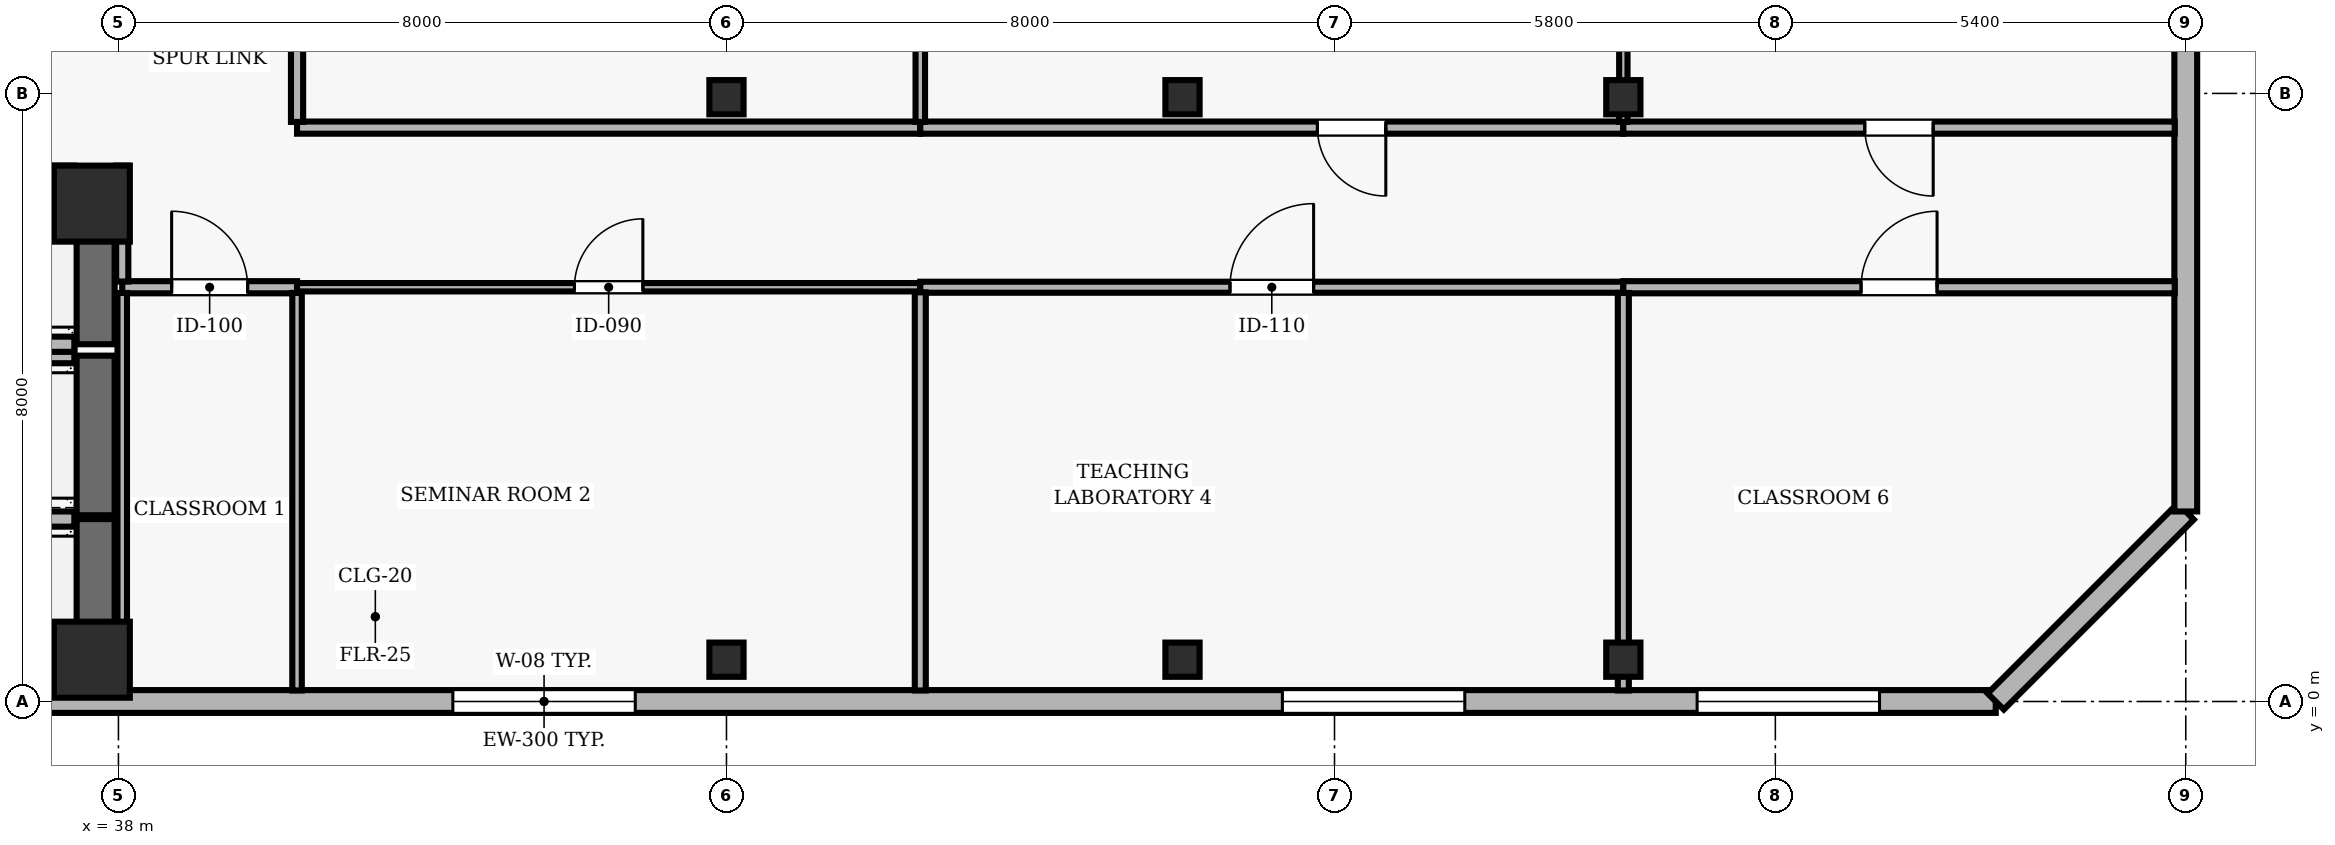
"""IFC4 building model, lengths in metres.
Left out: names, types, materials, properties, quantities, classifications, styles, units other than length and angle.
Written with IfcOpenShell. Run it as: python <this file> out.ifc"""

import sys

from ifc_helpers import new_model, si_unit, direction, frame, frame_2d, origin, origin_2d, place, context, subcontext, project, spatial, rectangle, hollow_rectangle, extrude, element, fill, save


model = new_model("IFC4")
c1 = context("Model", 3, precision=1e-05, world=origin(), true_north=direction((0.0, 1.0)))
c2 = subcontext(c1, "Body", "Model", "MODEL_VIEW")
j1 = project(units=[si_unit("LENGTHUNIT", "METRE"), si_unit("PLANEANGLEUNIT", "RADIAN")], contexts=[c1])
p1 = place(None, origin())
s1 = spatial("IfcSite", under=j1, at=p1, CompositionType="ELEMENT")
p2 = place(p1, origin())
s2 = spatial("IfcBuilding", under=s1, at=p2, CompositionType="ELEMENT")
p3 = place(p2, frame((0.0, 0.0, 179.7)))
s3 = spatial("IfcBuildingStorey", under=s2, at=p3, CompositionType="ELEMENT", Elevation=179.7)
for number, where, z_axis, x_axis in (
    (1, (37.65, 0.55, 0.0), (0.0, 0.0, 1.0), (1.0, 0.0, 0.0)),
    (2, (37.65, 6.55, 0.0), (0.0, 0.0, 1.0), (1.0, 0.0, 0.0)),
):
    element("IfcColumn", number, at=place(p3, frame(where, z_axis=z_axis, x_axis=x_axis)), inside=s3, PredefinedType="COLUMN", context=c2, shape_type="SweptSolid", body=[
        extrude(rectangle(XDim=1.0, YDim=1.0, at=origin_2d()), origin(), (0.0, 0.0, 1.0), 3.9),
    ])
for number, where, z_axis, x_axis in (
    (3, (46.0, 0.55, 0.0), (0.0, 0.0, 1.0), (1.0, 0.0, 0.0)),
    (4, (46.0, 7.95, 0.0), (0.0, 0.0, 1.0), (1.0, 0.0, 0.0)),
    (5, (52.0, 0.55, 0.0), (0.0, 0.0, 1.0), (1.0, 0.0, 0.0)),
    (6, (52.0, 7.95, 0.0), (0.0, 0.0, 1.0), (1.0, 0.0, 0.0)),
    (7, (57.8, 0.55, 0.0), (0.0, 0.0, 1.0), (1.0, 0.0, 0.0)),
    (8, (57.8, 7.95, 0.0), (0.0, 0.0, 1.0), (1.0, 0.0, 0.0)),
):
    element("IfcColumn", number, at=place(p3, frame(where, z_axis=z_axis, x_axis=x_axis)), inside=s3, PredefinedType="COLUMN", context=c2, shape_type="SweptSolid", body=[
        extrude(hollow_rectangle(XDim=0.45, YDim=0.45, WallThickness=0.02, at=origin_2d()), origin(), (0.0, 0.0, 1.0), 3.9),
    ])
p4 = place(p3, frame((24.5, 0.0, 0.0), z_axis=(0.0, 0.0, 1.0), x_axis=(1.0, 0.0, 0.0)))
e9 = element("IfcWall", 9, at=p4, inside=s3, PredefinedType="SOLIDWALL", context=c2, shape_type="SweptSolid", body=[
    extrude(rectangle(XDim=38.2, YDim=0.3, at=frame_2d((19.1, 0.0))), origin(), (0.0, 0.0, 1.0), 3.69),
])
p5 = place(p4, frame((1.529, 0.0, 0.9)))
e10 = element("IfcOpeningElement", 10, at=p5, cuts=e9, PredefinedType="OPENING", context=c2, shape_type="SweptSolid", body=[
    extrude(rectangle(XDim=2.4, YDim=1.8, at=frame_2d((1.2, 0.9))), frame((0.0, 0.16, 0.0), z_axis=(0.0, -1.0, 0.0), x_axis=(1.0, 0.0, 0.0)), (0.0, 0.0, 1.0), 0.32),
])
p6 = place(p4, frame((17.9, 0.0, 0.9)))
e11 = element("IfcOpeningElement", 11, at=p6, cuts=e9, PredefinedType="OPENING", context=c2, shape_type="SweptSolid", body=[
    extrude(rectangle(XDim=2.4, YDim=1.8, at=frame_2d((1.2, 0.9))), frame((0.0, 0.16, 0.0), z_axis=(0.0, -1.0, 0.0), x_axis=(1.0, 0.0, 0.0)), (0.0, 0.0, 1.0), 0.32),
])
p7 = place(p4, frame((28.814, 0.0, 0.9)))
e12 = element("IfcOpeningElement", 12, at=p7, cuts=e9, PredefinedType="OPENING", context=c2, shape_type="SweptSolid", body=[
    extrude(rectangle(XDim=2.4, YDim=1.8, at=frame_2d((1.2, 0.9))), frame((0.0, 0.16, 0.0), z_axis=(0.0, -1.0, 0.0), x_axis=(1.0, 0.0, 0.0)), (0.0, 0.0, 1.0), 0.32),
])
p8 = place(p4, frame((34.271, 0.0, 0.9)))
e13 = element("IfcOpeningElement", 13, at=p8, cuts=e9, PredefinedType="OPENING", context=c2, shape_type="SweptSolid", body=[
    extrude(rectangle(XDim=2.4, YDim=1.8, at=frame_2d((1.2, 0.9))), frame((0.0, 0.16, 0.0), z_axis=(0.0, -1.0, 0.0), x_axis=(1.0, 0.0, 0.0)), (0.0, 0.0, 1.0), 0.32),
])
p9 = place(p3, frame((62.7, 0.0, 0.0), z_axis=(0.0, 0.0, 1.0), x_axis=(0.707106781187, 0.707106781187, 0.0)))
e14 = element("IfcWall", 14, at=p9, inside=s3, PredefinedType="SOLIDWALL", context=c2, shape_type="SweptSolid", body=[
    extrude(rectangle(XDim=3.536, YDim=0.3, at=frame_2d((1.768, 0.0))), origin(), (0.0, 0.0, 1.0), 3.69),
])
p10 = place(p3, frame((65.2, 2.5, 0.0), z_axis=(0.0, 0.0, 1.0), x_axis=(0.0, 1.0, 0.0)))
e15 = element("IfcWall", 15, at=p10, inside=s3, PredefinedType="SOLIDWALL", context=c2, shape_type="SweptSolid", body=[
    extrude(rectangle(XDim=11.0, YDim=0.3, at=frame_2d((5.5, 0.0))), origin(), (0.0, 0.0, 1.0), 3.69),
])
p11 = place(p10, frame((7.35, 0.0, 0.9)))
e16 = element("IfcOpeningElement", 16, at=p11, cuts=e15, PredefinedType="OPENING", context=c2, shape_type="SweptSolid", body=[
    extrude(rectangle(XDim=1.8, YDim=2.2, at=frame_2d((0.9, 1.1))), frame((0.0, 0.16, 0.0), z_axis=(0.0, -1.0, 0.0), x_axis=(1.0, 0.0, 0.0)), (0.0, 0.0, 1.0), 0.32),
])
p12 = place(p3, frame((37.7, 0.3, 0.0), z_axis=(0.0, 0.0, 1.0), x_axis=(0.0, 1.0, 0.0)))
e17 = element("IfcWall", 17, at=p12, inside=s3, PredefinedType="SHEAR", context=c2, shape_type="SweptSolid", body=[
    extrude(rectangle(XDim=2.1, YDim=0.5, at=frame_2d((1.05, 0.0))), origin(), (0.0, 0.0, 1.0), 3.69),
])
for number, where, z_axis, x_axis in (
    (18, (35.28, 0.3, 0.0), (0.0, 0.0, 1.0), (1.0, 0.0, 0.0)),
    (19, (37.42, 2.4, 0.0), (0.0, 0.0, 1.0), (-1.0, 0.0, 0.0)),
):
    element("IfcWall", number, at=place(p3, frame(where, z_axis=z_axis, x_axis=x_axis)), inside=s3, PredefinedType="SOLIDWALL", context=c2, shape_type="SweptSolid", body=[
        extrude(rectangle(XDim=2.14, YDim=0.2, at=frame_2d((1.07, 0.0))), origin(), (0.0, 0.0, 1.0), 3.69),
    ])
p13 = place(p3, frame((37.7, 2.45, 0.0), z_axis=(0.0, 0.0, 1.0), x_axis=(0.0, 1.0, 0.0)))
e20 = element("IfcWall", 20, at=p13, inside=s3, PredefinedType="SHEAR", context=c2, shape_type="SweptSolid", body=[
    extrude(rectangle(XDim=2.1, YDim=0.5, at=frame_2d((1.05, 0.0))), origin(), (0.0, 0.0, 1.0), 3.69),
])
p14 = place(p3, frame((37.42, 4.55, 0.0), z_axis=(0.0, 0.0, 1.0), x_axis=(-1.0, 0.0, 0.0)))
e21 = element("IfcWall", 21, at=p14, inside=s3, PredefinedType="SOLIDWALL", context=c2, shape_type="SweptSolid", body=[
    extrude(rectangle(XDim=2.14, YDim=0.2, at=frame_2d((1.07, 0.0))), origin(), (0.0, 0.0, 1.0), 3.69),
])
p15 = place(p3, frame((37.7, 4.7, 0.0), z_axis=(0.0, 0.0, 1.0), x_axis=(0.0, 1.0, 0.0)))
e22 = element("IfcWall", 22, at=p15, inside=s3, PredefinedType="SHEAR", context=c2, shape_type="SweptSolid", body=[
    extrude(rectangle(XDim=2.25, YDim=0.5, at=frame_2d((1.125, 0.0))), origin(), (0.0, 0.0, 1.0), 3.69),
])
for number, where, z_axis, x_axis in (
    (23, (35.28, 4.7, 0.0), (0.0, 0.0, 1.0), (1.0, 0.0, 0.0)),
    (24, (37.42, 6.95, 0.0), (0.0, 0.0, 1.0), (-1.0, 0.0, 0.0)),
):
    element("IfcWall", number, at=place(p3, frame(where, z_axis=z_axis, x_axis=x_axis)), inside=s3, PredefinedType="SOLIDWALL", context=c2, shape_type="SweptSolid", body=[
        extrude(rectangle(XDim=2.14, YDim=0.2, at=frame_2d((1.07, 0.0))), origin(), (0.0, 0.0, 1.0), 3.69),
    ])
p16 = place(p3, frame((38.05, 5.45, 0.0), z_axis=(0.0, 0.0, 1.0), x_axis=(1.0, 0.0, 0.0)))
e25 = element("IfcWall", 25, at=p16, inside=s3, PredefinedType="PARTITIONING", context=c2, shape_type="SweptSolid", body=[
    extrude(rectangle(XDim=2.3, YDim=0.16, at=frame_2d((1.15, 0.0))), origin(), (0.0, 0.0, 1.0), 3.372),
])
p17 = place(p16, frame((0.65, 0.0, 0.0)))
e26 = element("IfcOpeningElement", 26, at=p17, cuts=e25, PredefinedType="OPENING", context=c2, shape_type="SweptSolid", body=[
    extrude(rectangle(XDim=1.0, YDim=2.1, at=frame_2d((0.5, 1.05))), frame((0.0, 0.09, 0.0), z_axis=(0.0, -1.0, 0.0), x_axis=(1.0, 0.0, 0.0)), (0.0, 0.0, 1.0), 0.18),
])
p18 = place(p3, frame((40.35, 5.45, 0.0), z_axis=(0.0, 0.0, 1.0), x_axis=(1.0, 0.0, 0.0)))
e27 = element("IfcWall", 27, at=p18, inside=s3, PredefinedType="MOVABLE", context=c2, shape_type="SweptSolid", body=[
    extrude(rectangle(XDim=8.2, YDim=0.11, at=frame_2d((4.1, 0.0))), origin(), (0.0, 0.0, 1.0), 3.372),
])
p19 = place(p18, frame((3.65, 0.0, 0.0)))
e28 = element("IfcOpeningElement", 28, at=p19, cuts=e27, PredefinedType="OPENING", context=c2, shape_type="SweptSolid", body=[
    extrude(rectangle(XDim=0.9, YDim=2.1, at=frame_2d((0.45, 1.05))), frame((0.0, 0.065, 0.0), z_axis=(0.0, -1.0, 0.0), x_axis=(1.0, 0.0, 0.0)), (0.0, 0.0, 1.0), 0.13),
])
p20 = place(p3, frame((48.55, 5.45, 0.0), z_axis=(0.0, 0.0, 1.0), x_axis=(1.0, 0.0, 0.0)))
e29 = element("IfcWall", 29, at=p20, inside=s3, PredefinedType="PARTITIONING", context=c2, shape_type="SweptSolid", body=[
    extrude(rectangle(XDim=9.25, YDim=0.145, at=frame_2d((4.625, 0.0))), origin(), (0.0, 0.0, 1.0), 3.372),
])
p21 = place(p20, frame((4.075, 0.0, 0.0)))
e30 = element("IfcOpeningElement", 30, at=p21, cuts=e29, PredefinedType="OPENING", context=c2, shape_type="SweptSolid", body=[
    extrude(rectangle(XDim=1.1, YDim=2.15, at=frame_2d((0.55, 1.075))), frame((0.0, 0.083, 0.0), z_axis=(0.0, -1.0, 0.0), x_axis=(1.0, 0.0, 0.0)), (0.0, 0.0, 1.0), 0.165),
])
p22 = place(p3, frame((48.55, 7.55, 0.0), z_axis=(0.0, 0.0, 1.0), x_axis=(-1.0, 0.0, 0.0)))
e31 = element("IfcWall", 31, at=p22, inside=s3, PredefinedType="PARTITIONING", context=c2, shape_type="SweptSolid", body=[
    extrude(rectangle(XDim=8.2, YDim=0.16, at=frame_2d((4.1, 0.0))), origin(), (0.0, 0.0, 1.0), 3.146),
])
p23 = place(p3, frame((57.8, 5.45, 0.0), z_axis=(0.0, 0.0, 1.0), x_axis=(1.0, 0.0, 0.0)))
e32 = element("IfcWall", 32, at=p23, inside=s3, PredefinedType="PARTITIONING", context=c2, shape_type="SweptSolid", body=[
    extrude(rectangle(XDim=7.255, YDim=0.16, at=frame_2d((3.627, 0.0))), origin(), (0.0, 0.0, 1.0), 3.69),
])
p24 = place(p23, frame((3.128, 0.0, 0.0)))
e33 = element("IfcOpeningElement", 33, at=p24, cuts=e32, PredefinedType="OPENING", context=c2, shape_type="SweptSolid", body=[
    extrude(rectangle(XDim=1.0, YDim=2.1, at=frame_2d((0.5, 1.05))), frame((0.0, 0.09, 0.0), z_axis=(0.0, -1.0, 0.0), x_axis=(1.0, 0.0, 0.0)), (0.0, 0.0, 1.0), 0.18),
])
p25 = place(p3, frame((57.8, 7.55, 0.0), z_axis=(0.0, 0.0, 1.0), x_axis=(-1.0, 0.0, 0.0)))
e34 = element("IfcWall", 34, at=p25, inside=s3, PredefinedType="PARTITIONING", context=c2, shape_type="SweptSolid", body=[
    extrude(rectangle(XDim=9.25, YDim=0.16, at=frame_2d((4.625, 0.0))), origin(), (0.0, 0.0, 1.0), 3.146),
])
p26 = place(p25, frame((3.125, 0.0, 0.0)))
e35 = element("IfcOpeningElement", 35, at=p26, cuts=e34, PredefinedType="OPENING", context=c2, shape_type="SweptSolid", body=[
    extrude(rectangle(XDim=0.9, YDim=2.1, at=frame_2d((0.45, 1.05))), frame((0.0, 0.09, 0.0), z_axis=(0.0, -1.0, 0.0), x_axis=(1.0, 0.0, 0.0)), (0.0, 0.0, 1.0), 0.18),
])
p27 = place(p3, frame((65.055, 7.55, 0.0), z_axis=(0.0, 0.0, 1.0), x_axis=(-1.0, 0.0, 0.0)))
e36 = element("IfcWall", 36, at=p27, inside=s3, PredefinedType="PARTITIONING", context=c2, shape_type="SweptSolid", body=[
    extrude(rectangle(XDim=7.255, YDim=0.16, at=frame_2d((3.627, 0.0))), origin(), (0.0, 0.0, 1.0), 3.69),
])
p28 = place(p27, frame((3.178, 0.0, 0.0)))
e37 = element("IfcOpeningElement", 37, at=p28, cuts=e36, PredefinedType="OPENING", context=c2, shape_type="SweptSolid", body=[
    extrude(rectangle(XDim=0.9, YDim=2.1, at=frame_2d((0.45, 1.05))), frame((0.0, 0.09, 0.0), z_axis=(0.0, -1.0, 0.0), x_axis=(1.0, 0.0, 0.0)), (0.0, 0.0, 1.0), 0.18),
])
p29 = place(p3, frame((38.05, 5.375, 0.0), z_axis=(0.0, 0.0, 1.0), x_axis=(0.0, -1.0, 0.0)))
e38 = element("IfcWall", 38, at=p29, inside=s3, PredefinedType="PARTITIONING", context=c2, shape_type="SweptSolid", body=[
    extrude(rectangle(XDim=5.23, YDim=0.125, at=frame_2d((2.615, 0.0))), origin(), (0.0, 0.0, 1.0), 3.146),
])
p30 = place(p3, frame((38.05, 7.05, 0.0), z_axis=(0.0, 0.0, 1.0), x_axis=(0.0, -1.0, 0.0)))
e39 = element("IfcWall", 39, at=p30, inside=s3, PredefinedType="PARTITIONING", context=c2, shape_type="SweptSolid", body=[
    extrude(rectangle(XDim=1.525, YDim=0.16, at=frame_2d((0.763, 0.0))), origin(), (0.0, 0.0, 1.0), 3.146),
])
p31 = place(p3, frame((40.35, 0.145, 0.0), z_axis=(0.0, 0.0, 1.0), x_axis=(0.0, 1.0, 0.0)))
e40 = element("IfcWall", 40, at=p31, inside=s3, PredefinedType="PARTITIONING", context=c2, shape_type="SweptSolid", body=[
    extrude(rectangle(XDim=5.23, YDim=0.125, at=frame_2d((2.615, 0.0))), origin(), (0.0, 0.0, 1.0), 3.69),
])
p32 = place(p3, frame((40.35, 7.625, 0.0), z_axis=(0.0, 0.0, 1.0), x_axis=(0.0, 1.0, 0.0)))
e41 = element("IfcWall", 41, at=p32, inside=s3, PredefinedType="PARTITIONING", context=c2, shape_type="SweptSolid", body=[
    extrude(rectangle(XDim=8.3, YDim=0.16, at=frame_2d((4.15, 0.0))), origin(), (0.0, 0.0, 1.0), 3.372),
])
p33 = place(p32, frame((3.65, 0.0, 0.0)))
e42 = element("IfcOpeningElement", 42, at=p33, cuts=e41, PredefinedType="OPENING", context=c2, shape_type="SweptSolid", body=[
    extrude(rectangle(XDim=1.0, YDim=2.1, at=frame_2d((0.5, 1.05))), frame((0.0, 0.09, 0.0), z_axis=(0.0, -1.0, 0.0), x_axis=(1.0, 0.0, 0.0)), (0.0, 0.0, 1.0), 0.18),
])
p34 = place(p3, frame((48.55, 0.145, 0.0), z_axis=(0.0, 0.0, 1.0), x_axis=(0.0, 1.0, 0.0)))
e43 = element("IfcWall", 43, at=p34, inside=s3, PredefinedType="PARTITIONING", context=c2, shape_type="SweptSolid", body=[
    extrude(rectangle(XDim=5.238, YDim=0.145, at=frame_2d((2.619, 0.0))), origin(), (0.0, 0.0, 1.0), 3.69),
])
p35 = place(p3, frame((48.55, 7.625, 0.0), z_axis=(0.0, 0.0, 1.0), x_axis=(0.0, 1.0, 0.0)))
e44 = element("IfcWall", 44, at=p35, inside=s3, PredefinedType="PARTITIONING", context=c2, shape_type="SweptSolid", body=[
    extrude(rectangle(XDim=8.318, YDim=0.125, at=frame_2d((4.159, 0.0))), origin(), (0.0, 0.0, 1.0), 3.69),
])
p36 = place(p3, frame((57.8, 0.145, 0.0), z_axis=(0.0, 0.0, 1.0), x_axis=(0.0, 1.0, 0.0)))
e45 = element("IfcWall", 45, at=p36, inside=s3, PredefinedType="PARTITIONING", context=c2, shape_type="SweptSolid", body=[
    extrude(rectangle(XDim=5.23, YDim=0.145, at=frame_2d((2.615, 0.0))), origin(), (0.0, 0.0, 1.0), 3.146),
])
p37 = place(p3, frame((57.8, 7.625, 0.0), z_axis=(0.0, 0.0, 1.0), x_axis=(0.0, 1.0, 0.0)))
e46 = element("IfcWall", 46, at=p37, inside=s3, PredefinedType="MOVABLE", context=c2, shape_type="SweptSolid", body=[
    extrude(rectangle(XDim=8.23, YDim=0.11, at=frame_2d((4.115, 0.0))), origin(), (0.0, 0.0, 1.0), 3.146),
])
p38 = place(p6, origin())
e47 = element("IfcWindow", 47, at=p38, inside=s3, PartitioningType="SINGLE_PANEL", PredefinedType="WINDOW", context=c2, shape_type="SweptSolid", body=[
    extrude(rectangle(XDim=2.4, YDim=1.8, at=frame_2d((1.2, 0.9))), frame((0.0, 0.03, 0.0), z_axis=(0.0, -1.0, 0.0), x_axis=(1.0, 0.0, 0.0)), (0.0, 0.0, 1.0), 0.06),
])
fill(e11, e47)
p39 = place(p7, origin())
e48 = element("IfcWindow", 48, at=p39, inside=s3, PartitioningType="SINGLE_PANEL", PredefinedType="WINDOW", context=c2, shape_type="SweptSolid", body=[
    extrude(rectangle(XDim=2.4, YDim=1.8, at=frame_2d((1.2, 0.9))), frame((0.0, 0.03, 0.0), z_axis=(0.0, -1.0, 0.0), x_axis=(1.0, 0.0, 0.0)), (0.0, 0.0, 1.0), 0.06),
])
fill(e12, e48)
p40 = place(p8, origin())
e49 = element("IfcWindow", 49, at=p40, inside=s3, PartitioningType="SINGLE_PANEL", PredefinedType="WINDOW", context=c2, shape_type="SweptSolid", body=[
    extrude(rectangle(XDim=2.4, YDim=1.8, at=frame_2d((1.2, 0.9))), frame((0.0, 0.03, 0.0), z_axis=(0.0, -1.0, 0.0), x_axis=(1.0, 0.0, 0.0)), (0.0, 0.0, 1.0), 0.06),
])
fill(e13, e49)
p41 = place(p17, origin())
e50 = element("IfcDoor", 50, at=p41, inside=s3, OperationType="SINGLE_SWING_LEFT", PredefinedType="DOOR", context=c2, shape_type="SweptSolid", body=[
    extrude(rectangle(XDim=1.0, YDim=2.1, at=frame_2d((0.5, 1.05))), frame((0.0, 0.025, 0.0), z_axis=(0.0, -1.0, 0.0), x_axis=(1.0, 0.0, 0.0)), (0.0, 0.0, 1.0), 0.05),
])
fill(e26, e50)
p42 = place(p19, origin())
e51 = element("IfcDoor", 51, at=p42, inside=s3, OperationType="SINGLE_SWING_RIGHT", PredefinedType="DOOR", context=c2, shape_type="SweptSolid", body=[
    extrude(rectangle(XDim=0.9, YDim=2.1, at=frame_2d((0.45, 1.05))), frame((0.0, 0.025, 0.0), z_axis=(0.0, -1.0, 0.0), x_axis=(1.0, 0.0, 0.0)), (0.0, 0.0, 1.0), 0.05),
])
fill(e28, e51)
p43 = place(p21, origin())
e52 = element("IfcDoor", 52, at=p43, inside=s3, OperationType="SINGLE_SWING_RIGHT", PredefinedType="DOOR", context=c2, shape_type="SweptSolid", body=[
    extrude(rectangle(XDim=1.1, YDim=2.15, at=frame_2d((0.55, 1.075))), frame((0.0, 0.025, 0.0), z_axis=(0.0, -1.0, 0.0), x_axis=(1.0, 0.0, 0.0)), (0.0, 0.0, 1.0), 0.05),
])
fill(e30, e52)
p44 = place(p26, origin())
e53 = element("IfcDoor", 53, at=p44, inside=s3, OperationType="SINGLE_SWING_LEFT", PredefinedType="DOOR", context=c2, shape_type="SweptSolid", body=[
    extrude(rectangle(XDim=0.9, YDim=2.1, at=frame_2d((0.45, 1.05))), frame((0.0, 0.025, 0.0), z_axis=(0.0, -1.0, 0.0), x_axis=(1.0, 0.0, 0.0)), (0.0, 0.0, 1.0), 0.05),
])
fill(e35, e53)
p45 = place(p24, origin())
e54 = element("IfcDoor", 54, at=p45, inside=s3, OperationType="SINGLE_SWING_RIGHT", PredefinedType="DOOR", context=c2, shape_type="SweptSolid", body=[
    extrude(rectangle(XDim=1.0, YDim=2.1, at=frame_2d((0.5, 1.05))), frame((0.0, 0.025, 0.0), z_axis=(0.0, -1.0, 0.0), x_axis=(1.0, 0.0, 0.0)), (0.0, 0.0, 1.0), 0.05),
])
fill(e33, e54)
p46 = place(p28, origin())
e55 = element("IfcDoor", 55, at=p46, inside=s3, OperationType="SINGLE_SWING_LEFT", PredefinedType="DOOR", context=c2, shape_type="SweptSolid", body=[
    extrude(rectangle(XDim=0.9, YDim=2.1, at=frame_2d((0.45, 1.05))), frame((0.0, 0.025, 0.0), z_axis=(0.0, -1.0, 0.0), x_axis=(1.0, 0.0, 0.0)), (0.0, 0.0, 1.0), 0.05),
])
fill(e37, e55)
save(model, sys.argv[1])
